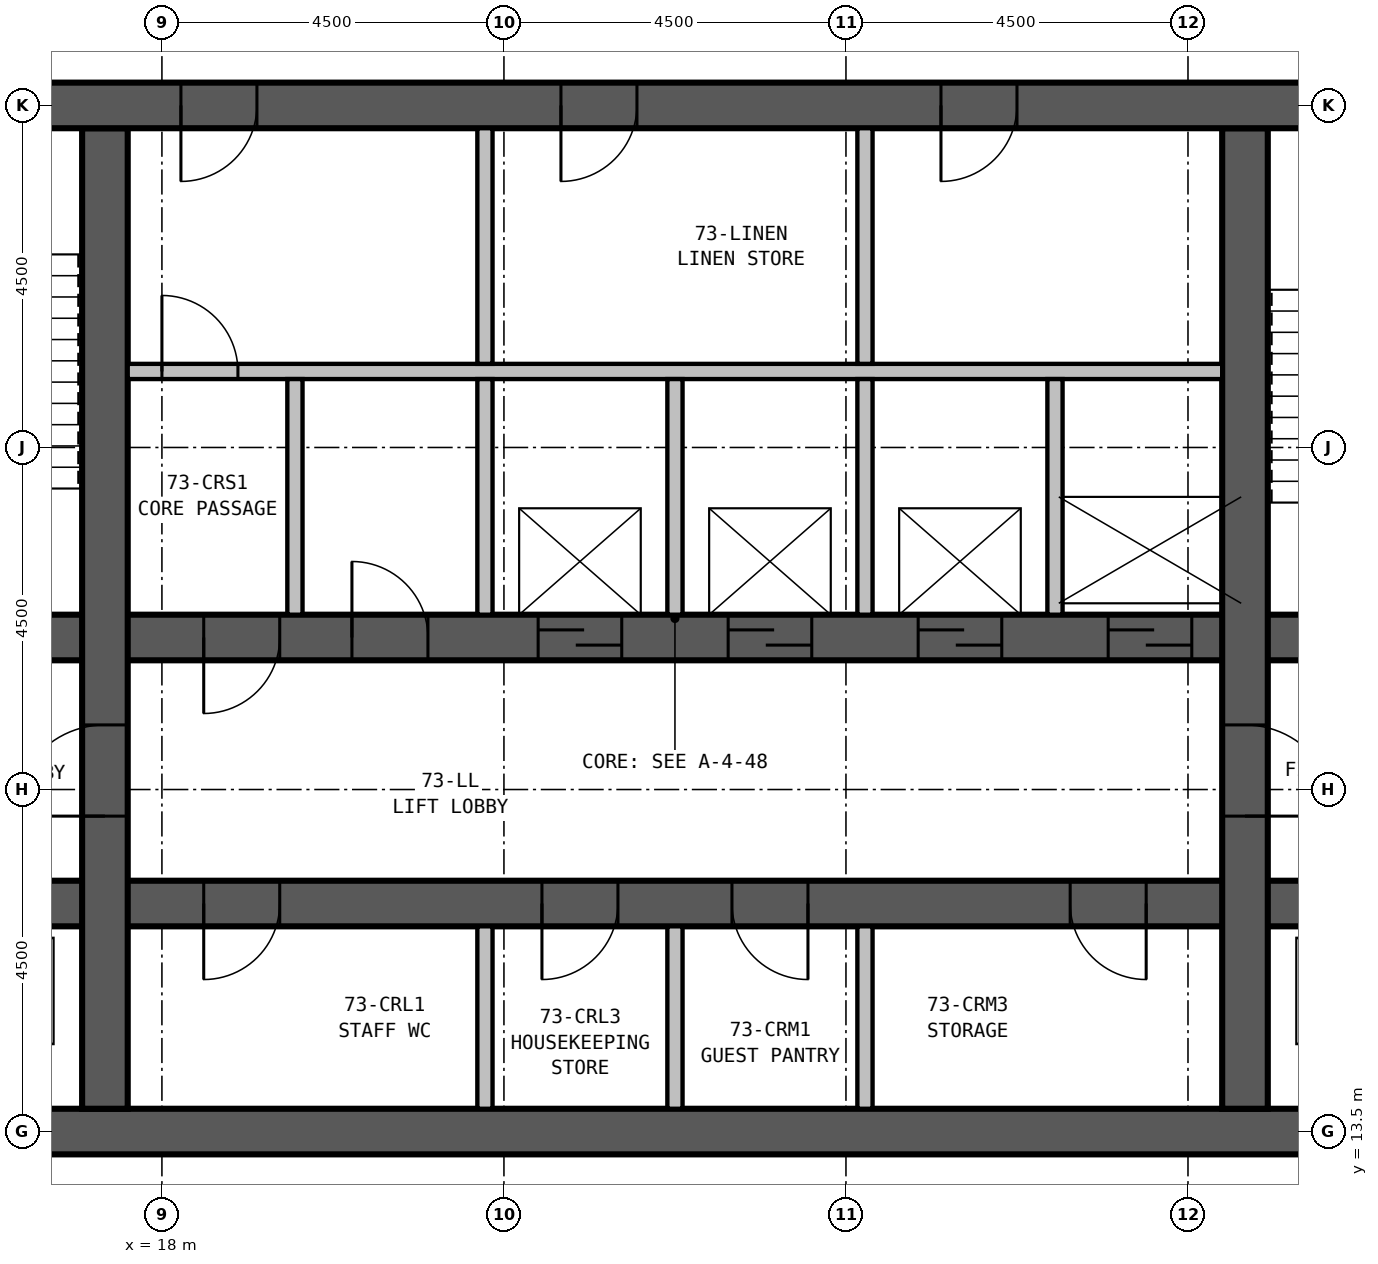
"""IFC4 building model, lengths in metres.
Left out: names, types, materials, properties, quantities, classifications, styles, units other than length and angle.
Written with IfcOpenShell. Run it as: python <this file> out.ifc"""

import sys

from ifc_helpers import new_model, si_unit, direction, frame, frame_2d, origin, place, context, subcontext, project, spatial, rectangle, extrude, element, fill, save


model = new_model("IFC4")
c1 = context("Model", 3, precision=1e-05, world=origin(), true_north=direction((0.0, 1.0)))
c2 = subcontext(c1, "Body", "Model", "MODEL_VIEW")
j1 = project(units=[si_unit("LENGTHUNIT", "METRE"), si_unit("PLANEANGLEUNIT", "RADIAN")], contexts=[c1])
p1 = place(None, origin())
s1 = spatial("IfcSite", under=j1, at=p1, CompositionType="ELEMENT")
p2 = place(p1, origin())
s2 = spatial("IfcBuilding", under=s1, at=p2, CompositionType="ELEMENT")
p3 = place(p2, frame((0.0, 0.0, 285.8)))
s3 = spatial("IfcBuildingStorey", under=s2, at=p3, CompositionType="ELEMENT", Elevation=285.8)
p4 = place(p3, frame((13.2, 13.5, 0.0), z_axis=(0.0, 0.0, 1.0), x_axis=(1.0, 0.0, 0.0)))
e1 = element("IfcWall", 1, at=p4, inside=s3, PredefinedType="SHEAR", context=c2, shape_type="SweptSolid", body=[
    extrude(rectangle(XDim=23.1, YDim=0.6, at=frame_2d((11.55, 0.0))), origin(), (0.0, 0.0, 1.0), 3.9),
])
p5 = place(p3, frame((36.3, 27.0, 0.0), z_axis=(0.0, 0.0, 1.0), x_axis=(-1.0, 0.0, 0.0)))
e2 = element("IfcWall", 2, at=p5, inside=s3, PredefinedType="SHEAR", context=c2, shape_type="SweptSolid", body=[
    extrude(rectangle(XDim=23.6, YDim=0.6, at=frame_2d((11.8, 0.0))), origin(), (0.0, 0.0, 1.0), 3.9),
])
p6 = place(p5, frame((17.05, 0.0, 0.0)))
e3 = element("IfcOpeningElement", 3, at=p6, cuts=e2, PredefinedType="OPENING", context=c2, shape_type="SweptSolid", body=[
    extrude(rectangle(XDim=1.0, YDim=2.1, at=frame_2d((0.5, 1.05))), frame((0.0, 0.31, 0.0), z_axis=(0.0, -1.0, 0.0), x_axis=(1.0, 0.0, 0.0)), (0.0, 0.0, 1.0), 0.62),
])
p7 = place(p5, frame((12.05, 0.0, 0.0)))
e4 = element("IfcOpeningElement", 4, at=p7, cuts=e2, PredefinedType="OPENING", context=c2, shape_type="SweptSolid", body=[
    extrude(rectangle(XDim=1.0, YDim=2.1, at=frame_2d((0.5, 1.05))), frame((0.0, 0.31, 0.0), z_axis=(0.0, -1.0, 0.0), x_axis=(1.0, 0.0, 0.0)), (0.0, 0.0, 1.0), 0.62),
])
p8 = place(p5, frame((7.05, 0.0, 0.0)))
e5 = element("IfcOpeningElement", 5, at=p8, cuts=e2, PredefinedType="OPENING", context=c2, shape_type="SweptSolid", body=[
    extrude(rectangle(XDim=1.0, YDim=2.1, at=frame_2d((0.5, 1.05))), frame((0.0, 0.31, 0.0), z_axis=(0.0, -1.0, 0.0), x_axis=(1.0, 0.0, 0.0)), (0.0, 0.0, 1.0), 0.62),
])
p9 = place(p3, frame((17.25, 13.8, 0.0), z_axis=(0.0, 0.0, 1.0), x_axis=(0.0, 1.0, 0.0)))
e6 = element("IfcWall", 6, at=p9, inside=s3, PredefinedType="SHEAR", context=c2, shape_type="SweptSolid", body=[
    extrude(rectangle(XDim=12.9, YDim=0.6, at=frame_2d((6.45, 0.0))), origin(), (0.0, 0.0, 1.0), 3.9),
])
p10 = place(p9, frame((3.85, 0.0, 0.0)))
e7 = element("IfcOpeningElement", 7, at=p10, cuts=e6, PredefinedType="OPENING", context=c2, shape_type="SweptSolid", body=[
    extrude(rectangle(XDim=1.2, YDim=2.1, at=frame_2d((0.6, 1.05))), frame((0.0, 0.31, 0.0), z_axis=(0.0, -1.0, 0.0), x_axis=(1.0, 0.0, 0.0)), (0.0, 0.0, 1.0), 0.62),
])
p11 = place(p3, frame((32.25, 13.8, 0.0), z_axis=(0.0, 0.0, 1.0), x_axis=(0.0, 1.0, 0.0)))
e8 = element("IfcWall", 8, at=p11, inside=s3, PredefinedType="SHEAR", context=c2, shape_type="SweptSolid", body=[
    extrude(rectangle(XDim=12.9, YDim=0.6, at=frame_2d((6.45, 0.0))), origin(), (0.0, 0.0, 1.0), 3.9),
])
p12 = place(p11, frame((5.05, 0.0, 0.0), z_axis=(0.0, 0.0, 1.0), x_axis=(-1.0, 0.0, 0.0)))
e9 = element("IfcOpeningElement", 9, at=p12, cuts=e8, PredefinedType="OPENING", context=c2, shape_type="SweptSolid", body=[
    extrude(rectangle(XDim=1.2, YDim=2.1, at=frame_2d((0.6, 1.05))), frame((0.0, 0.31, 0.0), z_axis=(0.0, -1.0, 0.0), x_axis=(1.0, 0.0, 0.0)), (0.0, 0.0, 1.0), 0.62),
])
p13 = place(p3, frame((13.8, 16.5, 0.0), z_axis=(0.0, 0.0, 1.0), x_axis=(1.0, 0.0, 0.0)))
e10 = element("IfcWall", 10, at=p13, inside=s3, PredefinedType="SHEAR", context=c2, shape_type="SweptSolid", body=[
    extrude(rectangle(XDim=21.9, YDim=0.6, at=frame_2d((10.95, 0.0))), origin(), (0.0, 0.0, 1.0), 3.9),
])
p14 = place(p13, frame((5.75, 0.0, 0.0), z_axis=(0.0, 0.0, 1.0), x_axis=(-1.0, 0.0, 0.0)))
e11 = element("IfcOpeningElement", 11, at=p14, cuts=e10, PredefinedType="OPENING", context=c2, shape_type="SweptSolid", body=[
    extrude(rectangle(XDim=1.0, YDim=2.1, at=frame_2d((0.5, 1.05))), frame((0.0, 0.31, 0.0), z_axis=(0.0, -1.0, 0.0), x_axis=(1.0, 0.0, 0.0)), (0.0, 0.0, 1.0), 0.62),
])
p15 = place(p13, frame((10.2, 0.0, 0.0), z_axis=(0.0, 0.0, 1.0), x_axis=(-1.0, 0.0, 0.0)))
e12 = element("IfcOpeningElement", 12, at=p15, cuts=e10, PredefinedType="OPENING", context=c2, shape_type="SweptSolid", body=[
    extrude(rectangle(XDim=1.0, YDim=2.1, at=frame_2d((0.5, 1.05))), frame((0.0, 0.31, 0.0), z_axis=(0.0, -1.0, 0.0), x_axis=(1.0, 0.0, 0.0)), (0.0, 0.0, 1.0), 0.62),
])
p16 = place(p13, frame((12.7, 0.0, 0.0), z_axis=(0.0, 0.0, 1.0), x_axis=(-1.0, 0.0, 0.0)))
e13 = element("IfcOpeningElement", 13, at=p16, cuts=e10, PredefinedType="OPENING", context=c2, shape_type="SweptSolid", body=[
    extrude(rectangle(XDim=1.0, YDim=2.1, at=frame_2d((0.5, 1.05))), frame((0.0, 0.31, 0.0), z_axis=(0.0, -1.0, 0.0), x_axis=(1.0, 0.0, 0.0)), (0.0, 0.0, 1.0), 0.62),
])
p17 = place(p13, frame((17.15, 0.0, 0.0), z_axis=(0.0, 0.0, 1.0), x_axis=(-1.0, 0.0, 0.0)))
e14 = element("IfcOpeningElement", 14, at=p17, cuts=e10, PredefinedType="OPENING", context=c2, shape_type="SweptSolid", body=[
    extrude(rectangle(XDim=1.0, YDim=2.1, at=frame_2d((0.5, 1.05))), frame((0.0, 0.31, 0.0), z_axis=(0.0, -1.0, 0.0), x_axis=(1.0, 0.0, 0.0)), (0.0, 0.0, 1.0), 0.62),
])
p18 = place(p13, frame((0.6, 0.0, 0.0)))
e15 = element("IfcOpeningElement", 15, at=p18, cuts=e10, PredefinedType="OPENING", context=c2, shape_type="SweptSolid", body=[
    extrude(rectangle(XDim=1.2, YDim=2.1, at=frame_2d((0.6, 1.05))), frame((0.0, 0.31, 0.0), z_axis=(0.0, -1.0, 0.0), x_axis=(1.0, 0.0, 0.0)), (0.0, 0.0, 1.0), 0.62),
])
p19 = place(p13, frame((19.6, 0.0, 0.0)))
e16 = element("IfcOpeningElement", 16, at=p19, cuts=e10, PredefinedType="OPENING", context=c2, shape_type="SweptSolid", body=[
    extrude(rectangle(XDim=1.2, YDim=2.1, at=frame_2d((0.6, 1.05))), frame((0.0, 0.31, 0.0), z_axis=(0.0, -1.0, 0.0), x_axis=(1.0, 0.0, 0.0)), (0.0, 0.0, 1.0), 0.62),
])
p20 = place(p3, frame((13.8, 20.0, 0.0), z_axis=(0.0, 0.0, 1.0), x_axis=(1.0, 0.0, 0.0)))
e17 = element("IfcWall", 17, at=p20, inside=s3, PredefinedType="SHEAR", context=c2, shape_type="SweptSolid", body=[
    extrude(rectangle(XDim=21.9, YDim=0.6, at=frame_2d((10.95, 0.0))), origin(), (0.0, 0.0, 1.0), 3.9),
])
p21 = place(p20, frame((0.5, 0.0, 0.0)))
e18 = element("IfcOpeningElement", 18, at=p21, cuts=e17, PredefinedType="OPENING", context=c2, shape_type="SweptSolid", body=[
    extrude(rectangle(XDim=1.0, YDim=2.1, at=frame_2d((0.5, 1.05))), frame((0.0, 0.31, 0.0), z_axis=(0.0, -1.0, 0.0), x_axis=(1.0, 0.0, 0.0)), (0.0, 0.0, 1.0), 0.62),
])
p22 = place(p20, frame((20.5, 0.0, 0.0)))
e19 = element("IfcOpeningElement", 19, at=p22, cuts=e17, PredefinedType="OPENING", context=c2, shape_type="SweptSolid", body=[
    extrude(rectangle(XDim=1.0, YDim=2.1, at=frame_2d((0.5, 1.05))), frame((0.0, 0.31, 0.0), z_axis=(0.0, -1.0, 0.0), x_axis=(1.0, 0.0, 0.0)), (0.0, 0.0, 1.0), 0.62),
])
p23 = place(p20, frame((9.15, 0.0, 0.0)))
e20 = element("IfcOpeningElement", 20, at=p23, cuts=e17, PredefinedType="OPENING", context=c2, shape_type="SweptSolid", body=[
    extrude(rectangle(XDim=1.1, YDim=2.1, at=frame_2d((0.55, 1.05))), frame((0.0, 0.31, 0.0), z_axis=(0.0, -1.0, 0.0), x_axis=(1.0, 0.0, 0.0)), (0.0, 0.0, 1.0), 0.62),
])
p24 = place(p20, frame((11.65, 0.0, 0.0)))
e21 = element("IfcOpeningElement", 21, at=p24, cuts=e17, PredefinedType="OPENING", context=c2, shape_type="SweptSolid", body=[
    extrude(rectangle(XDim=1.1, YDim=2.1, at=frame_2d((0.55, 1.05))), frame((0.0, 0.31, 0.0), z_axis=(0.0, -1.0, 0.0), x_axis=(1.0, 0.0, 0.0)), (0.0, 0.0, 1.0), 0.62),
])
p25 = place(p20, frame((14.15, 0.0, 0.0)))
e22 = element("IfcOpeningElement", 22, at=p25, cuts=e17, PredefinedType="OPENING", context=c2, shape_type="SweptSolid", body=[
    extrude(rectangle(XDim=1.1, YDim=2.1, at=frame_2d((0.55, 1.05))), frame((0.0, 0.31, 0.0), z_axis=(0.0, -1.0, 0.0), x_axis=(1.0, 0.0, 0.0)), (0.0, 0.0, 1.0), 0.62),
])
p26 = place(p20, frame((16.65, 0.0, 0.0)))
e23 = element("IfcOpeningElement", 23, at=p26, cuts=e17, PredefinedType="OPENING", context=c2, shape_type="SweptSolid", body=[
    extrude(rectangle(XDim=1.1, YDim=2.1, at=frame_2d((0.55, 1.05))), frame((0.0, 0.31, 0.0), z_axis=(0.0, -1.0, 0.0), x_axis=(1.0, 0.0, 0.0)), (0.0, 0.0, 1.0), 0.62),
])
p27 = place(p20, frame((5.75, 0.0, 0.0), z_axis=(0.0, 0.0, 1.0), x_axis=(-1.0, 0.0, 0.0)))
e24 = element("IfcOpeningElement", 24, at=p27, cuts=e17, PredefinedType="OPENING", context=c2, shape_type="SweptSolid", body=[
    extrude(rectangle(XDim=1.0, YDim=2.1, at=frame_2d((0.5, 1.05))), frame((0.0, 0.31, 0.0), z_axis=(0.0, -1.0, 0.0), x_axis=(1.0, 0.0, 0.0)), (0.0, 0.0, 1.0), 0.62),
])
p28 = place(p20, frame((6.7, 0.0, 0.0)))
e25 = element("IfcOpeningElement", 25, at=p28, cuts=e17, PredefinedType="OPENING", context=c2, shape_type="SweptSolid", body=[
    extrude(rectangle(XDim=1.0, YDim=2.1, at=frame_2d((0.5, 1.05))), frame((0.0, 0.31, 0.0), z_axis=(0.0, -1.0, 0.0), x_axis=(1.0, 0.0, 0.0)), (0.0, 0.0, 1.0), 0.62),
])
p29 = place(p3, frame((19.75, 20.3, 0.0), z_axis=(0.0, 0.0, 1.0), x_axis=(0.0, 1.0, 0.0)))
e26 = element("IfcWall", 26, at=p29, inside=s3, PredefinedType="PARTITIONING", context=c2, shape_type="SweptSolid", body=[
    extrude(rectangle(XDim=3.1, YDim=0.2, at=frame_2d((1.55, 0.0))), origin(), (0.0, 0.0, 1.0), 3.65),
])
p30 = place(p3, frame((22.25, 13.8, 0.0), z_axis=(0.0, 0.0, 1.0), x_axis=(0.0, 1.0, 0.0)))
e27 = element("IfcWall", 27, at=p30, inside=s3, PredefinedType="PARTITIONING", context=c2, shape_type="SweptSolid", body=[
    extrude(rectangle(XDim=2.4, YDim=0.2, at=frame_2d((1.2, 0.0))), origin(), (0.0, 0.0, 1.0), 3.65),
])
p31 = place(p3, frame((22.25, 20.3, 0.0), z_axis=(0.0, 0.0, 1.0), x_axis=(0.0, 1.0, 0.0)))
e28 = element("IfcWall", 28, at=p31, inside=s3, PredefinedType="PARTITIONING", context=c2, shape_type="SweptSolid", body=[
    extrude(rectangle(XDim=3.1, YDim=0.2, at=frame_2d((1.55, 0.0))), origin(), (0.0, 0.0, 1.0), 3.65),
])
p32 = place(p3, frame((24.75, 13.8, 0.0), z_axis=(0.0, 0.0, 1.0), x_axis=(0.0, 1.0, 0.0)))
e29 = element("IfcWall", 29, at=p32, inside=s3, PredefinedType="PARTITIONING", context=c2, shape_type="SweptSolid", body=[
    extrude(rectangle(XDim=2.4, YDim=0.2, at=frame_2d((1.2, 0.0))), origin(), (0.0, 0.0, 1.0), 3.65),
])
p33 = place(p3, frame((24.75, 20.3, 0.0), z_axis=(0.0, 0.0, 1.0), x_axis=(0.0, 1.0, 0.0)))
e30 = element("IfcWall", 30, at=p33, inside=s3, PredefinedType="PARTITIONING", context=c2, shape_type="SweptSolid", body=[
    extrude(rectangle(XDim=3.1, YDim=0.2, at=frame_2d((1.55, 0.0))), origin(), (0.0, 0.0, 1.0), 3.65),
])
p34 = place(p3, frame((27.25, 13.8, 0.0), z_axis=(0.0, 0.0, 1.0), x_axis=(0.0, 1.0, 0.0)))
e31 = element("IfcWall", 31, at=p34, inside=s3, PredefinedType="PARTITIONING", context=c2, shape_type="SweptSolid", body=[
    extrude(rectangle(XDim=2.4, YDim=0.2, at=frame_2d((1.2, 0.0))), origin(), (0.0, 0.0, 1.0), 3.65),
])
for number, where, z_axis, x_axis in (
    (32, (27.25, 20.3, 0.0), (0.0, 0.0, 1.0), (0.0, 1.0, 0.0)),
    (33, (29.75, 20.3, 0.0), (0.0, 0.0, 1.0), (0.0, 1.0, 0.0)),
):
    element("IfcWall", number, at=place(p3, frame(where, z_axis=z_axis, x_axis=x_axis)), inside=s3, PredefinedType="PARTITIONING", context=c2, shape_type="SweptSolid", body=[
        extrude(rectangle(XDim=3.1, YDim=0.2, at=frame_2d((1.55, 0.0))), origin(), (0.0, 0.0, 1.0), 3.65),
    ])
p35 = place(p3, frame((17.55, 23.5, 0.0), z_axis=(0.0, 0.0, 1.0), x_axis=(1.0, 0.0, 0.0)))
e34 = element("IfcWall", 34, at=p35, inside=s3, PredefinedType="PARTITIONING", context=c2, shape_type="SweptSolid", body=[
    extrude(rectangle(XDim=14.4, YDim=0.2, at=frame_2d((7.2, 0.0))), origin(), (0.0, 0.0, 1.0), 3.65),
])
p36 = place(p35, frame((0.45, 0.0, 0.0)))
e35 = element("IfcOpeningElement", 35, at=p36, cuts=e34, PredefinedType="OPENING", context=c2, shape_type="SweptSolid", body=[
    extrude(rectangle(XDim=1.0, YDim=2.1, at=frame_2d((0.5, 1.05))), frame((0.0, 0.11, 0.0), z_axis=(0.0, -1.0, 0.0), x_axis=(1.0, 0.0, 0.0)), (0.0, 0.0, 1.0), 0.22),
])
for number, where, z_axis, x_axis in (
    (36, (22.25, 23.6, 0.0), (0.0, 0.0, 1.0), (0.0, 1.0, 0.0)),
    (37, (27.25, 23.6, 0.0), (0.0, 0.0, 1.0), (0.0, 1.0, 0.0)),
):
    element("IfcWall", number, at=place(p3, frame(where, z_axis=z_axis, x_axis=x_axis)), inside=s3, PredefinedType="PARTITIONING", context=c2, shape_type="SweptSolid", body=[
        extrude(rectangle(XDim=3.1, YDim=0.2, at=frame_2d((1.55, 0.0))), origin(), (0.0, 0.0, 1.0), 3.65),
    ])
p37 = place(p36, origin())
e38 = element("IfcDoor", 38, at=p37, inside=s3, OperationType="SINGLE_SWING_LEFT", PredefinedType="DOOR", context=c2, shape_type="SweptSolid", body=[
    extrude(rectangle(XDim=1.0, YDim=2.1, at=frame_2d((0.5, 1.05))), frame((0.0, 0.025, 0.0), z_axis=(0.0, -1.0, 0.0), x_axis=(1.0, 0.0, 0.0)), (0.0, 0.0, 1.0), 0.05),
])
fill(e35, e38)
p38 = place(p10, origin())
e39 = element("IfcDoor", 39, at=p38, inside=s3, OperationType="SINGLE_SWING_LEFT", PredefinedType="DOOR", context=c2, shape_type="SweptSolid", body=[
    extrude(rectangle(XDim=1.2, YDim=2.1, at=frame_2d((0.6, 1.05))), frame((0.0, 0.3, 0.0), z_axis=(0.0, -1.0, 0.0), x_axis=(1.0, 0.0, 0.0)), (0.0, 0.0, 1.0), 0.6),
])
fill(e7, e39)
p39 = place(p12, origin())
e40 = element("IfcDoor", 40, at=p39, inside=s3, OperationType="SINGLE_SWING_RIGHT", PredefinedType="DOOR", context=c2, shape_type="SweptSolid", body=[
    extrude(rectangle(XDim=1.2, YDim=2.1, at=frame_2d((0.6, 1.05))), frame((0.0, 0.3, 0.0), z_axis=(0.0, -1.0, 0.0), x_axis=(1.0, 0.0, 0.0)), (0.0, 0.0, 1.0), 0.6),
])
fill(e9, e40)
p40 = place(p23, origin())
e41 = element("IfcDoor", 41, at=p40, inside=s3, OperationType="SLIDING_TO_LEFT", PredefinedType="DOOR", context=c2, shape_type="SweptSolid", body=[
    extrude(rectangle(XDim=1.1, YDim=2.1, at=frame_2d((0.55, 1.05))), frame((0.0, 0.3, 0.0), z_axis=(0.0, -1.0, 0.0), x_axis=(1.0, 0.0, 0.0)), (0.0, 0.0, 1.0), 0.6),
])
fill(e20, e41)
p41 = place(p24, origin())
e42 = element("IfcDoor", 42, at=p41, inside=s3, OperationType="SLIDING_TO_LEFT", PredefinedType="DOOR", context=c2, shape_type="SweptSolid", body=[
    extrude(rectangle(XDim=1.1, YDim=2.1, at=frame_2d((0.55, 1.05))), frame((0.0, 0.3, 0.0), z_axis=(0.0, -1.0, 0.0), x_axis=(1.0, 0.0, 0.0)), (0.0, 0.0, 1.0), 0.6),
])
fill(e21, e42)
p42 = place(p25, origin())
e43 = element("IfcDoor", 43, at=p42, inside=s3, OperationType="SLIDING_TO_LEFT", PredefinedType="DOOR", context=c2, shape_type="SweptSolid", body=[
    extrude(rectangle(XDim=1.1, YDim=2.1, at=frame_2d((0.55, 1.05))), frame((0.0, 0.3, 0.0), z_axis=(0.0, -1.0, 0.0), x_axis=(1.0, 0.0, 0.0)), (0.0, 0.0, 1.0), 0.6),
])
fill(e22, e43)
p43 = place(p26, origin())
e44 = element("IfcDoor", 44, at=p43, inside=s3, OperationType="SLIDING_TO_LEFT", PredefinedType="DOOR", context=c2, shape_type="SweptSolid", body=[
    extrude(rectangle(XDim=1.1, YDim=2.1, at=frame_2d((0.55, 1.05))), frame((0.0, 0.3, 0.0), z_axis=(0.0, -1.0, 0.0), x_axis=(1.0, 0.0, 0.0)), (0.0, 0.0, 1.0), 0.6),
])
fill(e23, e44)
p44 = place(p14, origin())
e45 = element("IfcDoor", 45, at=p44, inside=s3, OperationType="SINGLE_SWING_RIGHT", PredefinedType="DOOR", context=c2, shape_type="SweptSolid", body=[
    extrude(rectangle(XDim=1.0, YDim=2.1, at=frame_2d((0.5, 1.05))), frame((0.0, 0.3, 0.0), z_axis=(0.0, -1.0, 0.0), x_axis=(1.0, 0.0, 0.0)), (0.0, 0.0, 1.0), 0.6),
])
fill(e11, e45)
p45 = place(p15, origin())
e46 = element("IfcDoor", 46, at=p45, inside=s3, OperationType="SINGLE_SWING_RIGHT", PredefinedType="DOOR", context=c2, shape_type="SweptSolid", body=[
    extrude(rectangle(XDim=1.0, YDim=2.1, at=frame_2d((0.5, 1.05))), frame((0.0, 0.3, 0.0), z_axis=(0.0, -1.0, 0.0), x_axis=(1.0, 0.0, 0.0)), (0.0, 0.0, 1.0), 0.6),
])
fill(e12, e46)
p46 = place(p16, origin())
e47 = element("IfcDoor", 47, at=p46, inside=s3, OperationType="SINGLE_SWING_LEFT", PredefinedType="DOOR", context=c2, shape_type="SweptSolid", body=[
    extrude(rectangle(XDim=1.0, YDim=2.1, at=frame_2d((0.5, 1.05))), frame((0.0, 0.3, 0.0), z_axis=(0.0, -1.0, 0.0), x_axis=(1.0, 0.0, 0.0)), (0.0, 0.0, 1.0), 0.6),
])
fill(e13, e47)
p47 = place(p17, origin())
e48 = element("IfcDoor", 48, at=p47, inside=s3, OperationType="SINGLE_SWING_LEFT", PredefinedType="DOOR", context=c2, shape_type="SweptSolid", body=[
    extrude(rectangle(XDim=1.0, YDim=2.1, at=frame_2d((0.5, 1.05))), frame((0.0, 0.3, 0.0), z_axis=(0.0, -1.0, 0.0), x_axis=(1.0, 0.0, 0.0)), (0.0, 0.0, 1.0), 0.6),
])
fill(e14, e48)
p48 = place(p27, origin())
e49 = element("IfcDoor", 49, at=p48, inside=s3, OperationType="SINGLE_SWING_RIGHT", PredefinedType="DOOR", context=c2, shape_type="SweptSolid", body=[
    extrude(rectangle(XDim=1.0, YDim=2.1, at=frame_2d((0.5, 1.05))), frame((0.0, 0.3, 0.0), z_axis=(0.0, -1.0, 0.0), x_axis=(1.0, 0.0, 0.0)), (0.0, 0.0, 1.0), 0.6),
])
fill(e24, e49)
p49 = place(p28, origin())
e50 = element("IfcDoor", 50, at=p49, inside=s3, OperationType="SINGLE_SWING_LEFT", PredefinedType="DOOR", context=c2, shape_type="SweptSolid", body=[
    extrude(rectangle(XDim=1.0, YDim=2.1, at=frame_2d((0.5, 1.05))), frame((0.0, 0.3, 0.0), z_axis=(0.0, -1.0, 0.0), x_axis=(1.0, 0.0, 0.0)), (0.0, 0.0, 1.0), 0.6),
])
fill(e25, e50)
p50 = place(p6, origin())
e51 = element("IfcDoor", 51, at=p50, inside=s3, OperationType="SINGLE_SWING_RIGHT", PredefinedType="DOOR", context=c2, shape_type="SweptSolid", body=[
    extrude(rectangle(XDim=1.0, YDim=2.1, at=frame_2d((0.5, 1.05))), frame((0.0, 0.3, 0.0), z_axis=(0.0, -1.0, 0.0), x_axis=(1.0, 0.0, 0.0)), (0.0, 0.0, 1.0), 0.6),
])
fill(e3, e51)
p51 = place(p7, origin())
e52 = element("IfcDoor", 52, at=p51, inside=s3, OperationType="SINGLE_SWING_RIGHT", PredefinedType="DOOR", context=c2, shape_type="SweptSolid", body=[
    extrude(rectangle(XDim=1.0, YDim=2.1, at=frame_2d((0.5, 1.05))), frame((0.0, 0.3, 0.0), z_axis=(0.0, -1.0, 0.0), x_axis=(1.0, 0.0, 0.0)), (0.0, 0.0, 1.0), 0.6),
])
fill(e4, e52)
p52 = place(p8, origin())
e53 = element("IfcDoor", 53, at=p52, inside=s3, OperationType="SINGLE_SWING_RIGHT", PredefinedType="DOOR", context=c2, shape_type="SweptSolid", body=[
    extrude(rectangle(XDim=1.0, YDim=2.1, at=frame_2d((0.5, 1.05))), frame((0.0, 0.3, 0.0), z_axis=(0.0, -1.0, 0.0), x_axis=(1.0, 0.0, 0.0)), (0.0, 0.0, 1.0), 0.6),
])
fill(e5, e53)
save(model, sys.argv[1])
